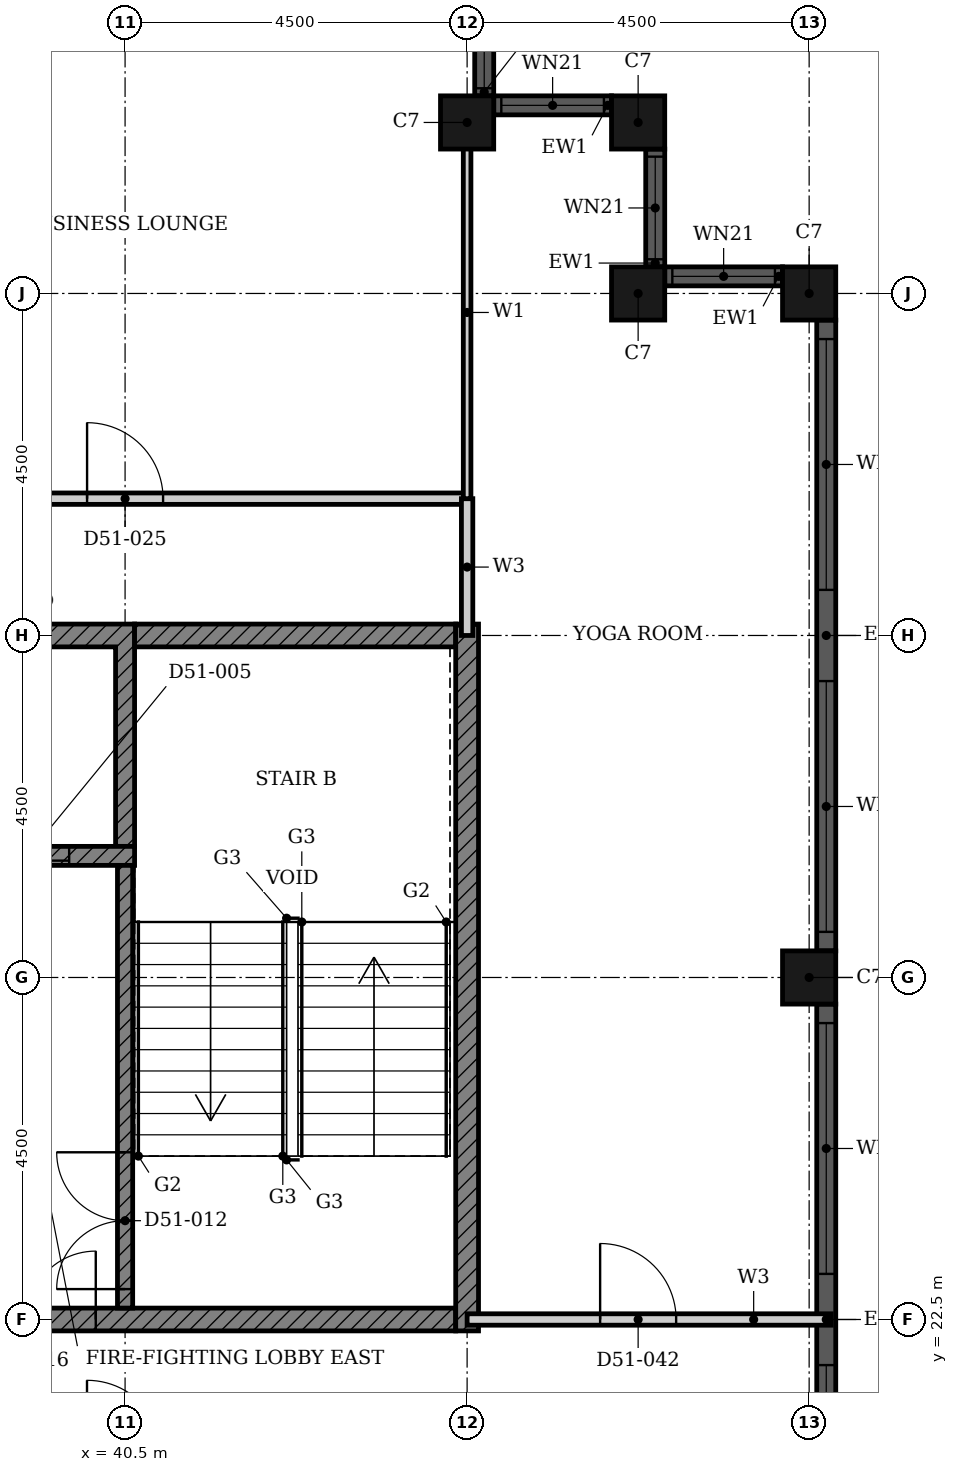
"""IFC4 building model, lengths in metres.
Left out: names, types, materials, properties, quantities, classifications, styles, units other than length and angle.
Written with IfcOpenShell. Run it as: python <this file> out.ifc"""

import sys

from ifc_helpers import new_model, si_unit, direction, frame, frame_2d, origin, origin_2d, place, context, subcontext, project, spatial, polyline, rectangle, hollow_rectangle, outline, extrude, element, fill, save


model = new_model("IFC4")
c1 = context("Model", 3, precision=1e-05, world=origin(), true_north=direction((0.0, 1.0)))
c2 = subcontext(c1, "Body", "Model", "MODEL_VIEW")
j1 = project(units=[si_unit("LENGTHUNIT", "METRE"), si_unit("PLANEANGLEUNIT", "RADIAN")], contexts=[c1])
p1 = place(None, origin())
s1 = spatial("IfcSite", under=j1, at=p1, CompositionType="ELEMENT")
p2 = place(p1, origin())
s2 = spatial("IfcBuilding", under=s1, at=p2, CompositionType="ELEMENT")
p3 = place(p2, frame((0.0, 0.0, 203.5)))
s3 = spatial("IfcBuildingStorey", under=s2, at=p3, CompositionType="ELEMENT", Elevation=203.5)
for number, where, z_axis, x_axis in (
    (1, (49.5, 27.0, 0.0), (0.0, 0.0, 1.0), (1.0, 0.0, 0.0)),
    (2, (49.5, 36.0, 0.0), (0.0, 0.0, 1.0), (1.0, 0.0, 0.0)),
    (3, (47.25, 36.0, 0.0), (0.0, 0.0, 1.0), (1.0, 0.0, 0.0)),
    (4, (47.25, 38.25, 0.0), (0.0, 0.0, 1.0), (1.0, 0.0, 0.0)),
    (5, (45.0, 38.25, 0.0), (0.0, 0.0, 1.0), (1.0, 0.0, 0.0)),
):
    element("IfcColumn", number, at=place(p3, frame(where, z_axis=z_axis, x_axis=x_axis)), inside=s3, PredefinedType="COLUMN", context=c2, shape_type="SweptSolid", body=[
        extrude(hollow_rectangle(XDim=0.7, YDim=0.7, WallThickness=0.022, at=origin_2d()), origin(), (0.0, 0.0, 1.0), 3.7),
    ])
p4 = place(p3, frame((49.725, 18.35, 0.0), z_axis=(0.0, 0.0, 1.0), x_axis=(0.0, 1.0, 0.0)))
e6 = element("IfcWall", 6, at=p4, inside=s3, PredefinedType="SOLIDWALL", context=c2, shape_type="SweptSolid", body=[
    extrude(rectangle(XDim=8.3, YDim=0.25, at=frame_2d((4.15, 0.0))), origin(), (0.0, 0.0, 1.0), 3.7),
])
p5 = place(p4, frame((0.25, 0.0, 0.45)))
e7 = element("IfcOpeningElement", 7, at=p5, cuts=e6, PredefinedType="OPENING", context=c2, shape_type="SweptSolid", body=[
    extrude(rectangle(XDim=3.3, YDim=2.3, at=frame_2d((1.65, 1.15))), frame((0.0, 0.135, 0.0), z_axis=(0.0, -1.0, 0.0), x_axis=(1.0, 0.0, 0.0)), (0.0, 0.0, 1.0), 0.27),
])
p6 = place(p4, frame((4.75, 0.0, 0.45)))
e8 = element("IfcOpeningElement", 8, at=p6, cuts=e6, PredefinedType="OPENING", context=c2, shape_type="SweptSolid", body=[
    extrude(rectangle(XDim=3.3, YDim=2.3, at=frame_2d((1.65, 1.15))), frame((0.0, 0.135, 0.0), z_axis=(0.0, -1.0, 0.0), x_axis=(1.0, 0.0, 0.0)), (0.0, 0.0, 1.0), 0.27),
])
p7 = place(p3, frame((49.725, 27.35, 0.0), z_axis=(0.0, 0.0, 1.0), x_axis=(0.0, 1.0, 0.0)))
e9 = element("IfcWall", 9, at=p7, inside=s3, PredefinedType="SOLIDWALL", context=c2, shape_type="SweptSolid", body=[
    extrude(rectangle(XDim=8.3, YDim=0.25, at=frame_2d((4.15, 0.0))), origin(), (0.0, 0.0, 1.0), 3.7),
])
p8 = place(p7, frame((0.25, 0.0, 0.45)))
e10 = element("IfcOpeningElement", 10, at=p8, cuts=e9, PredefinedType="OPENING", context=c2, shape_type="SweptSolid", body=[
    extrude(rectangle(XDim=3.3, YDim=2.3, at=frame_2d((1.65, 1.15))), frame((0.0, 0.135, 0.0), z_axis=(0.0, -1.0, 0.0), x_axis=(1.0, 0.0, 0.0)), (0.0, 0.0, 1.0), 0.27),
])
p9 = place(p7, frame((4.75, 0.0, 0.45)))
e11 = element("IfcOpeningElement", 11, at=p9, cuts=e9, PredefinedType="OPENING", context=c2, shape_type="SweptSolid", body=[
    extrude(rectangle(XDim=3.3, YDim=2.3, at=frame_2d((1.65, 1.15))), frame((0.0, 0.135, 0.0), z_axis=(0.0, -1.0, 0.0), x_axis=(1.0, 0.0, 0.0)), (0.0, 0.0, 1.0), 0.27),
])
p10 = place(p3, frame((49.15, 36.225, 0.0), z_axis=(0.0, 0.0, 1.0), x_axis=(-1.0, 0.0, 0.0)))
e12 = element("IfcWall", 12, at=p10, inside=s3, PredefinedType="SOLIDWALL", context=c2, shape_type="SweptSolid", body=[
    extrude(rectangle(XDim=1.55, YDim=0.25, at=frame_2d((0.775, 0.0))), origin(), (0.0, 0.0, 1.0), 3.7),
])
p11 = place(p10, frame((0.1, 0.0, 0.9)))
e13 = element("IfcOpeningElement", 13, at=p11, cuts=e12, PredefinedType="OPENING", context=c2, shape_type="SweptSolid", body=[
    extrude(rectangle(XDim=1.35, YDim=1.85, at=frame_2d((0.675, 0.925))), frame((0.0, 0.135, 0.0), z_axis=(0.0, -1.0, 0.0), x_axis=(1.0, 0.0, 0.0)), (0.0, 0.0, 1.0), 0.27),
])
p12 = place(p3, frame((47.475, 36.35, 0.0), z_axis=(0.0, 0.0, 1.0), x_axis=(0.0, 1.0, 0.0)))
e14 = element("IfcWall", 14, at=p12, inside=s3, PredefinedType="SOLIDWALL", context=c2, shape_type="SweptSolid", body=[
    extrude(rectangle(XDim=1.55, YDim=0.25, at=frame_2d((0.775, 0.0))), origin(), (0.0, 0.0, 1.0), 3.7),
])
p13 = place(p12, frame((0.1, 0.0, 0.9)))
e15 = element("IfcOpeningElement", 15, at=p13, cuts=e14, PredefinedType="OPENING", context=c2, shape_type="SweptSolid", body=[
    extrude(rectangle(XDim=1.35, YDim=1.85, at=frame_2d((0.675, 0.925))), frame((0.0, 0.135, 0.0), z_axis=(0.0, -1.0, 0.0), x_axis=(1.0, 0.0, 0.0)), (0.0, 0.0, 1.0), 0.27),
])
p14 = place(p3, frame((46.9, 38.475, 0.0), z_axis=(0.0, 0.0, 1.0), x_axis=(-1.0, 0.0, 0.0)))
e16 = element("IfcWall", 16, at=p14, inside=s3, PredefinedType="SOLIDWALL", context=c2, shape_type="SweptSolid", body=[
    extrude(rectangle(XDim=1.55, YDim=0.25, at=frame_2d((0.775, 0.0))), origin(), (0.0, 0.0, 1.0), 3.7),
])
p15 = place(p14, frame((0.1, 0.0, 0.9)))
e17 = element("IfcOpeningElement", 17, at=p15, cuts=e16, PredefinedType="OPENING", context=c2, shape_type="SweptSolid", body=[
    extrude(rectangle(XDim=1.35, YDim=1.85, at=frame_2d((0.675, 0.925))), frame((0.0, 0.135, 0.0), z_axis=(0.0, -1.0, 0.0), x_axis=(1.0, 0.0, 0.0)), (0.0, 0.0, 1.0), 0.27),
])
p16 = place(p3, frame((45.225, 38.6, 0.0), z_axis=(0.0, 0.0, 1.0), x_axis=(0.0, 1.0, 0.0)))
e18 = element("IfcWall", 18, at=p16, inside=s3, PredefinedType="SOLIDWALL", context=c2, shape_type="SweptSolid", body=[
    extrude(rectangle(XDim=1.55, YDim=0.25, at=frame_2d((0.775, 0.0))), origin(), (0.0, 0.0, 1.0), 3.7),
])
p17 = place(p16, frame((0.1, 0.0, 0.9)))
e19 = element("IfcOpeningElement", 19, at=p17, cuts=e18, PredefinedType="OPENING", context=c2, shape_type="SweptSolid", body=[
    extrude(rectangle(XDim=1.35, YDim=1.85, at=frame_2d((0.675, 0.925))), frame((0.0, 0.135, 0.0), z_axis=(0.0, -1.0, 0.0), x_axis=(1.0, 0.0, 0.0)), (0.0, 0.0, 1.0), 0.27),
])
p18 = place(p3, origin())
e20 = element("IfcWall", 20, at=p18, inside=s3, PredefinedType="SHEAR", context=c2, shape_type="SweptSolid", body=[
    extrude(outline(polyline([(35.232, 28.725), (35.482, 28.725), (35.482, 31.35), (37.803, 31.35), (37.803, 28.725), (38.053, 28.725), (38.053, 31.35), (40.375, 31.35), (40.375, 28.725), (40.625, 28.725), (40.625, 31.65), (35.232, 31.65), (35.232, 28.725)])), origin(), (0.0, 0.0, 1.0), 3.4),
])
p19 = place(p3, frame((32.911, 22.5, 0.0), z_axis=(0.0, 0.0, 1.0), x_axis=(1.0, 0.0, 0.0)))
e21 = element("IfcWall", 21, at=p19, inside=s3, PredefinedType="SHEAR", context=c2, shape_type="SweptSolid", body=[
    extrude(rectangle(XDim=11.939, YDim=0.3, at=frame_2d((5.97, 0.0))), origin(), (0.0, 0.0, 1.0), 3.4),
])
p20 = place(p19, frame((5.404, 0.0, 0.0)))
e22 = element("IfcOpeningElement", 22, at=p20, cuts=e21, PredefinedType="OPENING", context=c2, shape_type="SweptSolid", body=[
    extrude(rectangle(XDim=1.8, YDim=2.1, at=frame_2d((0.9, 1.05))), frame((0.0, 0.16, 0.0), z_axis=(0.0, -1.0, 0.0), x_axis=(1.0, 0.0, 0.0)), (0.0, 0.0, 1.0), 0.32),
])
p21 = place(p3, frame((40.625, 31.5, 0.0), z_axis=(0.0, 0.0, 1.0), x_axis=(1.0, 0.0, 0.0)))
e23 = element("IfcWall", 23, at=p21, inside=s3, PredefinedType="SHEAR", context=c2, shape_type="SweptSolid", body=[
    extrude(rectangle(XDim=4.225, YDim=0.3, at=frame_2d((2.113, 0.0))), origin(), (0.0, 0.0, 1.0), 3.4),
])
p22 = place(p3, frame((45.0, 22.35, 0.0), z_axis=(0.0, 0.0, 1.0), x_axis=(0.0, 1.0, 0.0)))
e24 = element("IfcWall", 24, at=p22, inside=s3, PredefinedType="SHEAR", context=c2, shape_type="SweptSolid", body=[
    extrude(rectangle(XDim=9.3, YDim=0.3, at=frame_2d((4.65, 0.0))), origin(), (0.0, 0.0, 1.0), 3.4),
])
p23 = place(p3, frame((24.947, 28.6, 0.0), z_axis=(0.0, 0.0, 1.0), x_axis=(1.0, 0.0, 0.0)))
e25 = element("IfcWall", 25, at=p23, inside=s3, PredefinedType="SHEAR", context=c2, shape_type="SweptSolid", body=[
    extrude(rectangle(XDim=15.678, YDim=0.25, at=frame_2d((7.839, 0.0))), origin(), (0.0, 0.0, 1.0), 3.4),
])
p24 = place(p23, frame((6.004, 0.0, 0.0)))
e26 = element("IfcOpeningElement", 26, at=p24, cuts=e25, PredefinedType="OPENING", context=c2, shape_type="SweptSolid", body=[
    extrude(rectangle(XDim=1.1, YDim=2.1, at=frame_2d((0.55, 1.05))), frame((0.0, 0.135, 0.0), z_axis=(0.0, -1.0, 0.0), x_axis=(1.0, 0.0, 0.0)), (0.0, 0.0, 1.0), 0.27),
])
p25 = place(p23, frame((11.146, 0.0, 0.0)))
e27 = element("IfcOpeningElement", 27, at=p25, cuts=e25, PredefinedType="OPENING", context=c2, shape_type="SweptSolid", body=[
    extrude(rectangle(XDim=1.1, YDim=2.1, at=frame_2d((0.55, 1.05))), frame((0.0, 0.135, 0.0), z_axis=(0.0, -1.0, 0.0), x_axis=(1.0, 0.0, 0.0)), (0.0, 0.0, 1.0), 0.27),
])
p26 = place(p23, frame((13.718, 0.0, 0.0)))
e28 = element("IfcOpeningElement", 28, at=p26, cuts=e25, PredefinedType="OPENING", context=c2, shape_type="SweptSolid", body=[
    extrude(rectangle(XDim=1.1, YDim=2.1, at=frame_2d((0.55, 1.05))), frame((0.0, 0.135, 0.0), z_axis=(0.0, -1.0, 0.0), x_axis=(1.0, 0.0, 0.0)), (0.0, 0.0, 1.0), 0.27),
])
p27 = place(p23, frame((0.961, 0.0, 0.0)))
e29 = element("IfcOpeningElement", 29, at=p27, cuts=e25, PredefinedType="OPENING", context=c2, shape_type="SweptSolid", body=[
    extrude(rectangle(XDim=0.9, YDim=2.1, at=frame_2d((0.45, 1.05))), frame((0.0, 0.135, 0.0), z_axis=(0.0, -1.0, 0.0), x_axis=(1.0, 0.0, 0.0)), (0.0, 0.0, 1.0), 0.27),
])
p28 = place(p23, frame((8.675, 0.0, 0.0)))
e30 = element("IfcOpeningElement", 30, at=p28, cuts=e25, PredefinedType="OPENING", context=c2, shape_type="SweptSolid", body=[
    extrude(rectangle(XDim=0.9, YDim=2.1, at=frame_2d((0.45, 1.05))), frame((0.0, 0.135, 0.0), z_axis=(0.0, -1.0, 0.0), x_axis=(1.0, 0.0, 0.0)), (0.0, 0.0, 1.0), 0.27),
])
p29 = place(p3, frame((40.5, 22.65, 0.0), z_axis=(0.0, 0.0, 1.0), x_axis=(0.0, 1.0, 0.0)))
e31 = element("IfcWall", 31, at=p29, inside=s3, PredefinedType="SHEAR", context=c2, shape_type="SweptSolid", body=[
    extrude(rectangle(XDim=5.825, YDim=0.2, at=frame_2d((2.913, 0.0))), origin(), (0.0, 0.0, 1.0), 3.4),
])
p30 = place(p29, frame((0.25, 0.0, 0.0)))
e32 = element("IfcOpeningElement", 32, at=p30, cuts=e31, PredefinedType="OPENING", context=c2, shape_type="SweptSolid", body=[
    extrude(rectangle(XDim=1.8, YDim=2.1, at=frame_2d((0.9, 1.05))), frame((0.0, 0.11, 0.0), z_axis=(0.0, -1.0, 0.0), x_axis=(1.0, 0.0, 0.0)), (0.0, 0.0, 1.0), 0.22),
])
p31 = place(p3, frame((45.0, 22.5, 0.0), z_axis=(0.0, 0.0, 1.0), x_axis=(1.0, 0.0, 0.0)))
e33 = element("IfcWall", 33, at=p31, inside=s3, PredefinedType="PARTITIONING", context=c2, shape_type="SweptSolid", body=[
    extrude(rectangle(XDim=4.79, YDim=0.15, at=frame_2d((2.395, 0.0))), origin(), (0.0, 0.0, 1.0), 3.4),
])
p32 = place(p31, frame((1.75, 0.0, 0.0)))
e34 = element("IfcOpeningElement", 34, at=p32, cuts=e33, PredefinedType="OPENING", context=c2, shape_type="SweptSolid", body=[
    extrude(rectangle(XDim=1.0, YDim=2.1, at=frame_2d((0.5, 1.05))), frame((0.0, 0.085, 0.0), z_axis=(0.0, -1.0, 0.0), x_axis=(1.0, 0.0, 0.0)), (0.0, 0.0, 1.0), 0.17),
])
p33 = place(p3, frame((36.0, 33.3, 0.0), z_axis=(0.0, 0.0, 1.0), x_axis=(1.0, 0.0, 0.0)))
e35 = element("IfcWall", 35, at=p33, inside=s3, PredefinedType="PARTITIONING", context=c2, shape_type="SweptSolid", body=[
    extrude(rectangle(XDim=9.0, YDim=0.15, at=frame_2d((4.5, 0.0))), origin(), (0.0, 0.0, 1.0), 3.4),
])
p34 = place(p33, frame((4.0, 0.0, 0.0)))
e36 = element("IfcOpeningElement", 36, at=p34, cuts=e35, PredefinedType="OPENING", context=c2, shape_type="SweptSolid", body=[
    extrude(rectangle(XDim=1.0, YDim=2.1, at=frame_2d((0.5, 1.05))), frame((0.0, 0.085, 0.0), z_axis=(0.0, -1.0, 0.0), x_axis=(1.0, 0.0, 0.0)), (0.0, 0.0, 1.0), 0.17),
])
p35 = place(p3, frame((45.0, 31.5, 0.0), z_axis=(0.0, 0.0, 1.0), x_axis=(0.0, 1.0, 0.0)))
e37 = element("IfcWall", 37, at=p35, inside=s3, PredefinedType="PARTITIONING", context=c2, shape_type="SweptSolid", body=[
    extrude(rectangle(XDim=1.8, YDim=0.15, at=frame_2d((0.9, 0.0))), origin(), (0.0, 0.0, 1.0), 3.4),
])
p36 = place(p3, frame((45.0, 33.3, 0.0), z_axis=(0.0, 0.0, 1.0), x_axis=(0.0, 1.0, 0.0)))
e38 = element("IfcWall", 38, at=p36, inside=s3, PredefinedType="PARTITIONING", context=c2, shape_type="SweptSolid", body=[
    extrude(rectangle(XDim=4.9, YDim=0.1, at=frame_2d((2.45, 0.0))), origin(), (0.0, 0.0, 1.0), 3.4),
])
p37 = place(p5, origin())
e39 = element("IfcWindow", 39, at=p37, inside=s3, PartitioningType="SINGLE_PANEL", PredefinedType="WINDOW", context=c2, shape_type="SweptSolid", body=[
    extrude(rectangle(XDim=3.3, YDim=2.3, at=frame_2d((1.65, 1.15))), frame((0.0, 0.03, 0.0), z_axis=(0.0, -1.0, 0.0), x_axis=(1.0, 0.0, 0.0)), (0.0, 0.0, 1.0), 0.06),
])
fill(e7, e39)
p38 = place(p6, origin())
e40 = element("IfcWindow", 40, at=p38, inside=s3, PartitioningType="SINGLE_PANEL", PredefinedType="WINDOW", context=c2, shape_type="SweptSolid", body=[
    extrude(rectangle(XDim=3.3, YDim=2.3, at=frame_2d((1.65, 1.15))), frame((0.0, 0.03, 0.0), z_axis=(0.0, -1.0, 0.0), x_axis=(1.0, 0.0, 0.0)), (0.0, 0.0, 1.0), 0.06),
])
fill(e8, e40)
p39 = place(p8, origin())
e41 = element("IfcWindow", 41, at=p39, inside=s3, PartitioningType="SINGLE_PANEL", PredefinedType="WINDOW", context=c2, shape_type="SweptSolid", body=[
    extrude(rectangle(XDim=3.3, YDim=2.3, at=frame_2d((1.65, 1.15))), frame((0.0, 0.03, 0.0), z_axis=(0.0, -1.0, 0.0), x_axis=(1.0, 0.0, 0.0)), (0.0, 0.0, 1.0), 0.06),
])
fill(e10, e41)
p40 = place(p9, origin())
e42 = element("IfcWindow", 42, at=p40, inside=s3, PartitioningType="SINGLE_PANEL", PredefinedType="WINDOW", context=c2, shape_type="SweptSolid", body=[
    extrude(rectangle(XDim=3.3, YDim=2.3, at=frame_2d((1.65, 1.15))), frame((0.0, 0.03, 0.0), z_axis=(0.0, -1.0, 0.0), x_axis=(1.0, 0.0, 0.0)), (0.0, 0.0, 1.0), 0.06),
])
fill(e11, e42)
p41 = place(p11, origin())
e43 = element("IfcWindow", 43, at=p41, inside=s3, PartitioningType="SINGLE_PANEL", PredefinedType="WINDOW", context=c2, shape_type="SweptSolid", body=[
    extrude(rectangle(XDim=1.35, YDim=1.85, at=frame_2d((0.675, 0.925))), frame((0.0, 0.03, 0.0), z_axis=(0.0, -1.0, 0.0), x_axis=(1.0, 0.0, 0.0)), (0.0, 0.0, 1.0), 0.06),
])
fill(e13, e43)
p42 = place(p13, origin())
e44 = element("IfcWindow", 44, at=p42, inside=s3, PartitioningType="SINGLE_PANEL", PredefinedType="WINDOW", context=c2, shape_type="SweptSolid", body=[
    extrude(rectangle(XDim=1.35, YDim=1.85, at=frame_2d((0.675, 0.925))), frame((0.0, 0.03, 0.0), z_axis=(0.0, -1.0, 0.0), x_axis=(1.0, 0.0, 0.0)), (0.0, 0.0, 1.0), 0.06),
])
fill(e15, e44)
p43 = place(p15, origin())
e45 = element("IfcWindow", 45, at=p43, inside=s3, PartitioningType="SINGLE_PANEL", PredefinedType="WINDOW", context=c2, shape_type="SweptSolid", body=[
    extrude(rectangle(XDim=1.35, YDim=1.85, at=frame_2d((0.675, 0.925))), frame((0.0, 0.03, 0.0), z_axis=(0.0, -1.0, 0.0), x_axis=(1.0, 0.0, 0.0)), (0.0, 0.0, 1.0), 0.06),
])
fill(e17, e45)
p44 = place(p17, origin())
e46 = element("IfcWindow", 46, at=p44, inside=s3, PartitioningType="SINGLE_PANEL", PredefinedType="WINDOW", context=c2, shape_type="SweptSolid", body=[
    extrude(rectangle(XDim=1.35, YDim=1.85, at=frame_2d((0.675, 0.925))), frame((0.0, 0.03, 0.0), z_axis=(0.0, -1.0, 0.0), x_axis=(1.0, 0.0, 0.0)), (0.0, 0.0, 1.0), 0.06),
])
fill(e19, e46)
p45 = place(p26, origin())
e47 = element("IfcDoor", 47, at=p45, inside=s3, OperationType="DOUBLE_DOOR_SLIDING", PredefinedType="DOOR", context=c2, shape_type="SweptSolid", body=[
    extrude(rectangle(XDim=1.1, YDim=2.1, at=frame_2d((0.55, 1.05))), frame((0.0, 0.025, 0.0), z_axis=(0.0, -1.0, 0.0), x_axis=(1.0, 0.0, 0.0)), (0.0, 0.0, 1.0), 0.05),
])
fill(e28, e47)
p46 = place(p30, origin())
e48 = element("IfcDoor", 48, at=p46, inside=s3, OperationType="DOUBLE_DOOR_SINGLE_SWING", PredefinedType="DOOR", context=c2, shape_type="SweptSolid", body=[
    extrude(rectangle(XDim=1.8, YDim=2.1, at=frame_2d((0.9, 1.05))), frame((0.0, 0.025, 0.0), z_axis=(0.0, -1.0, 0.0), x_axis=(1.0, 0.0, 0.0)), (0.0, 0.0, 1.0), 0.05),
])
fill(e32, e48)
p47 = place(p20, origin())
e49 = element("IfcDoor", 49, at=p47, inside=s3, OperationType="DOUBLE_DOOR_SINGLE_SWING", PredefinedType="DOOR", context=c2, shape_type="SweptSolid", body=[
    extrude(rectangle(XDim=1.8, YDim=2.1, at=frame_2d((0.9, 1.05))), frame((0.0, 0.025, 0.0), z_axis=(0.0, -1.0, 0.0), x_axis=(1.0, 0.0, 0.0)), (0.0, 0.0, 1.0), 0.05),
])
fill(e22, e49)
p48 = place(p34, origin())
e50 = element("IfcDoor", 50, at=p48, inside=s3, OperationType="SINGLE_SWING_LEFT", PredefinedType="DOOR", context=c2, shape_type="SweptSolid", body=[
    extrude(rectangle(XDim=1.0, YDim=2.1, at=frame_2d((0.5, 1.05))), frame((0.0, 0.025, 0.0), z_axis=(0.0, -1.0, 0.0), x_axis=(1.0, 0.0, 0.0)), (0.0, 0.0, 1.0), 0.05),
])
fill(e36, e50)
p49 = place(p32, origin())
e51 = element("IfcDoor", 51, at=p49, inside=s3, OperationType="SINGLE_SWING_RIGHT", PredefinedType="DOOR", context=c2, shape_type="SweptSolid", body=[
    extrude(rectangle(XDim=1.0, YDim=2.1, at=frame_2d((0.5, 1.05))), frame((0.0, 0.025, 0.0), z_axis=(0.0, -1.0, 0.0), x_axis=(1.0, 0.0, 0.0)), (0.0, 0.0, 1.0), 0.05),
])
fill(e34, e51)
save(model, sys.argv[1])
